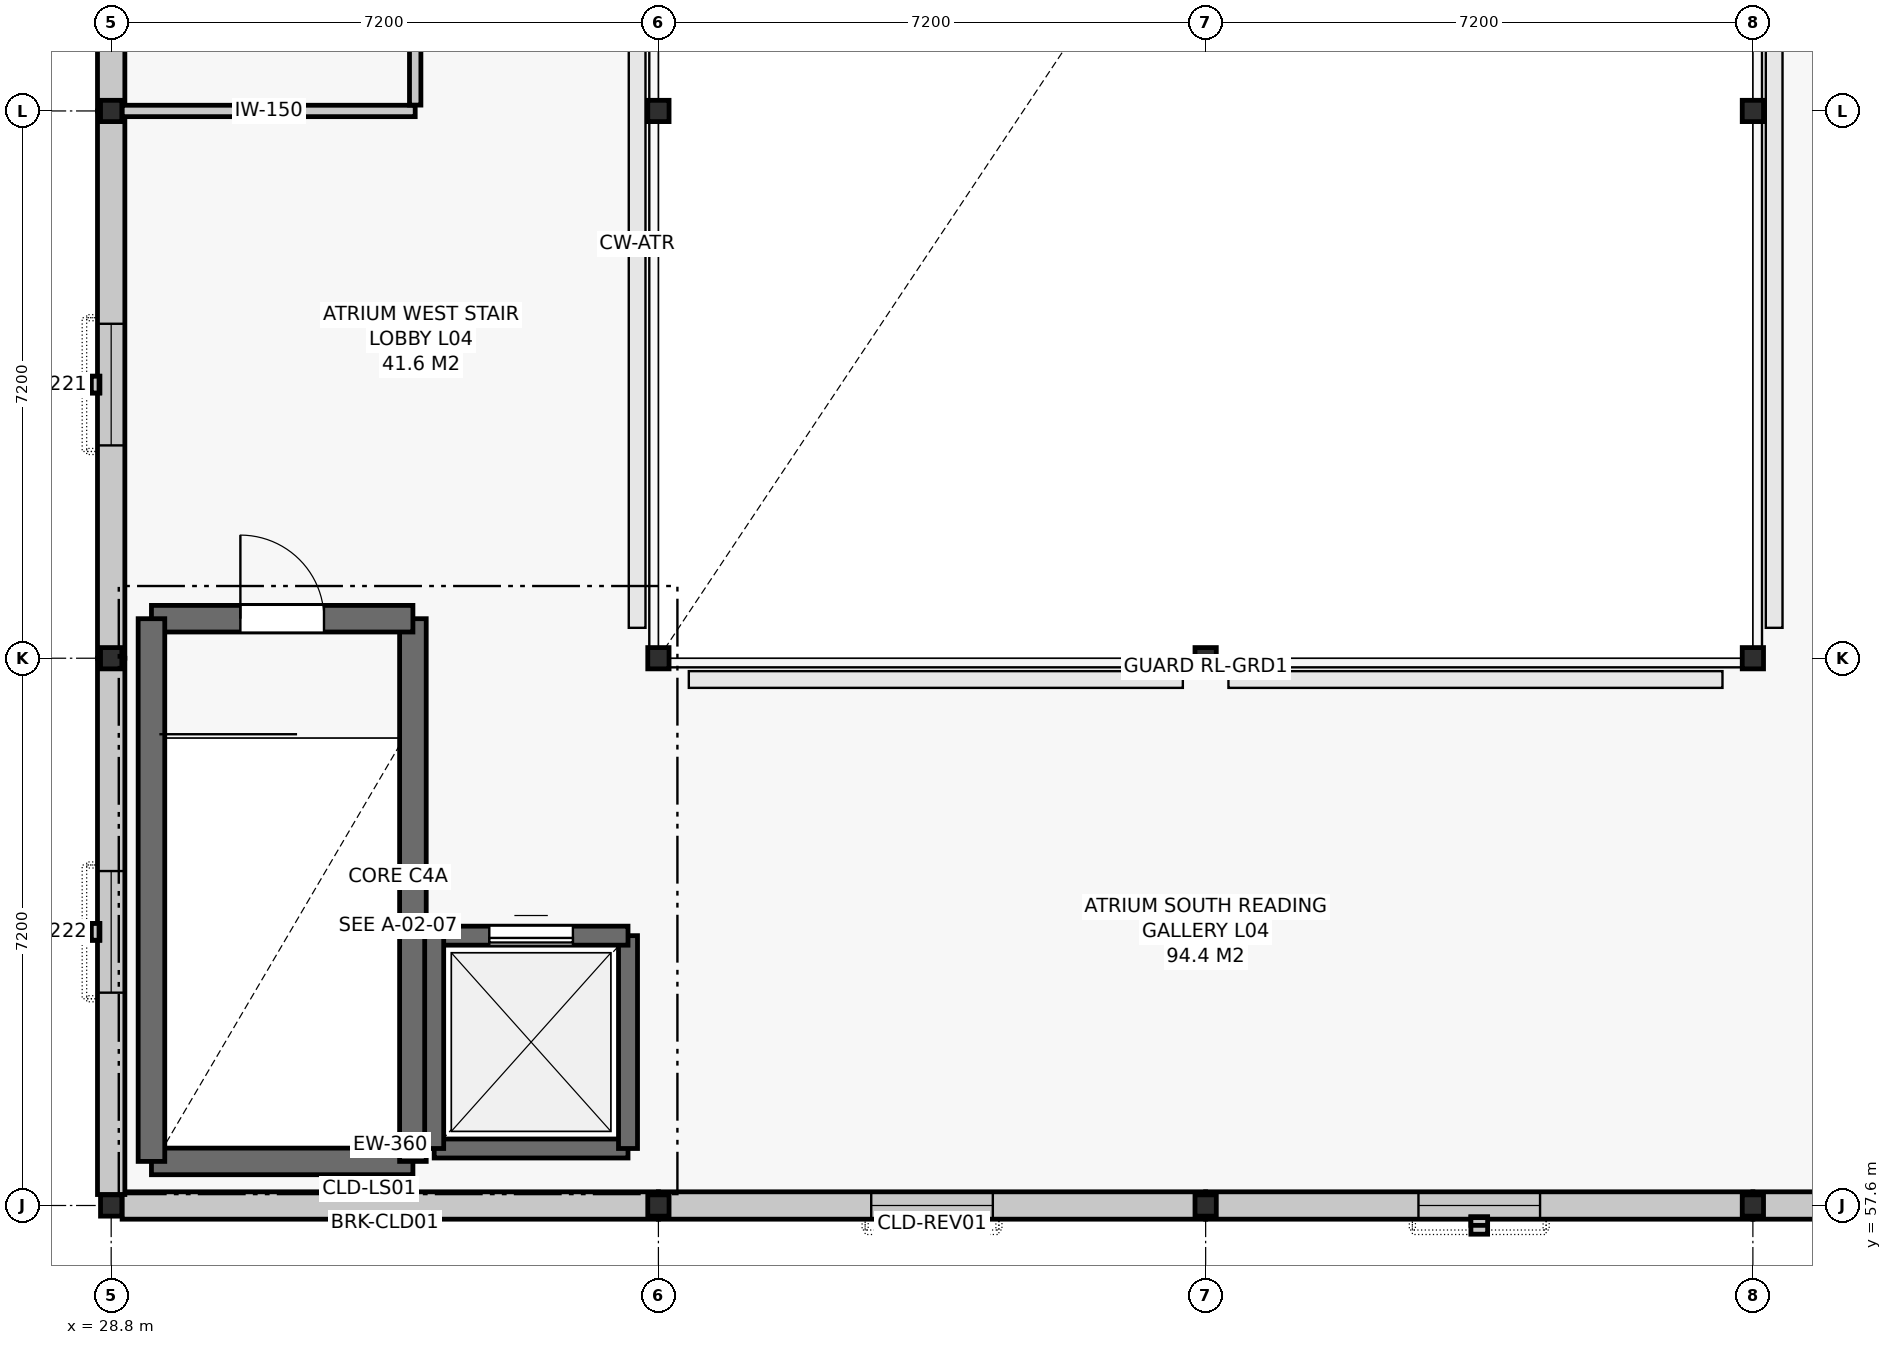
"""IFC4 building model, lengths in metres.
Left out: names, types, materials, properties, quantities, classifications, styles, units other than length and angle.
Written with IfcOpenShell. Run it as: python <this file> out.ifc"""

import sys

from ifc_helpers import new_model, si_unit, direction, frame, frame_2d, origin, origin_2d, place, context, subcontext, project, spatial, rectangle, i_section, extrude, element, fill, save


model = new_model("IFC4")
c1 = context("Model", 3, precision=1e-05, world=origin(), true_north=direction((0.0, 1.0)))
c2 = subcontext(c1, "Body", "Model", "MODEL_VIEW")
j1 = project(units=[si_unit("LENGTHUNIT", "METRE"), si_unit("PLANEANGLEUNIT", "RADIAN")], contexts=[c1])
p1 = place(None, origin())
s1 = spatial("IfcSite", under=j1, at=p1, CompositionType="ELEMENT")
p2 = place(p1, origin())
s2 = spatial("IfcBuilding", under=s1, at=p2, CompositionType="ELEMENT")
p3 = place(p2, frame((0.0, 0.0, 18.6)))
s3 = spatial("IfcBuildingStorey", under=s2, at=p3, CompositionType="ELEMENT", Elevation=18.6)
for number, where, z_axis, x_axis in (
    (1, (28.8, 57.6, 0.0), (0.0, 0.0, 1.0), (1.0, 0.0, 0.0)),
    (2, (28.8, 64.8, 0.0), (0.0, 0.0, 1.0), (1.0, 0.0, 0.0)),
    (3, (28.8, 72.0, 0.0), (0.0, 0.0, 1.0), (1.0, 0.0, 0.0)),
    (4, (36.0, 57.6, 0.0), (0.0, 0.0, 1.0), (1.0, 0.0, 0.0)),
    (5, (36.0, 64.8, 0.0), (0.0, 0.0, 1.0), (1.0, 0.0, 0.0)),
    (6, (36.0, 72.0, 0.0), (0.0, 0.0, 1.0), (1.0, 0.0, 0.0)),
    (7, (43.2, 57.6, 0.0), (0.0, 0.0, 1.0), (1.0, 0.0, 0.0)),
    (8, (43.2, 64.8, 0.0), (0.0, 0.0, 1.0), (1.0, 0.0, 0.0)),
    (9, (50.4, 57.6, 0.0), (0.0, 0.0, 1.0), (1.0, 0.0, 0.0)),
    (10, (50.4, 64.8, 0.0), (0.0, 0.0, 1.0), (1.0, 0.0, 0.0)),
    (11, (50.4, 72.0, 0.0), (0.0, 0.0, 1.0), (1.0, 0.0, 0.0)),
):
    element("IfcColumn", number, at=place(p3, frame(where, z_axis=z_axis, x_axis=x_axis)), inside=s3, PredefinedType="COLUMN", context=c2, shape_type="SweptSolid", body=[
        extrude(i_section(OverallWidth=0.28, OverallDepth=0.28, WebThickness=0.01, FlangeThickness=0.018, FilletRadius=0.024, at=origin_2d()), origin(), (0.0, 0.0, 1.0), 4.2),
    ])
p4 = place(p3, frame((28.944, 57.6, 0.0), z_axis=(0.0, 0.0, 1.0), x_axis=(1.0, 0.0, 0.0)))
e12 = element("IfcWall", 12, at=p4, inside=s3, PredefinedType="SOLIDWALL", context=c2, shape_type="SweptSolid", body=[
    extrude(rectangle(XDim=7.056, YDim=0.36, at=frame_2d((3.528, 0.0))), origin(), (0.0, 0.0, 1.0), 3.24),
])
p5 = place(p3, frame((36.0, 57.6, 0.0), z_axis=(0.0, 0.0, 1.0), x_axis=(1.0, 0.0, 0.0)))
e13 = element("IfcWall", 13, at=p5, inside=s3, PredefinedType="SOLIDWALL", context=c2, shape_type="SweptSolid", body=[
    extrude(rectangle(XDim=7.2, YDim=0.36, at=frame_2d((3.6, 0.0))), origin(), (0.0, 0.0, 1.0), 3.24),
])
p6 = place(p5, frame((2.8, 0.0, 0.95)))
e14 = element("IfcOpeningElement", 14, at=p6, cuts=e13, PredefinedType="OPENING", context=c2, shape_type="SweptSolid", body=[
    extrude(rectangle(XDim=1.6, YDim=1.75, at=frame_2d((0.8, 0.875))), frame((0.0, 0.192, 0.0), z_axis=(0.0, -1.0, 0.0), x_axis=(1.0, 0.0, 0.0)), (0.0, 0.0, 1.0), 0.384),
])
p7 = place(p3, frame((43.2, 57.6, 0.0), z_axis=(0.0, 0.0, 1.0), x_axis=(1.0, 0.0, 0.0)))
e15 = element("IfcWall", 15, at=p7, inside=s3, PredefinedType="SOLIDWALL", context=c2, shape_type="SweptSolid", body=[
    extrude(rectangle(XDim=7.2, YDim=0.36, at=frame_2d((3.6, 0.0))), origin(), (0.0, 0.0, 1.0), 3.24),
])
p8 = place(p7, frame((2.8, 0.0, 0.95)))
e16 = element("IfcOpeningElement", 16, at=p8, cuts=e15, PredefinedType="OPENING", context=c2, shape_type="SweptSolid", body=[
    extrude(rectangle(XDim=1.6, YDim=1.75, at=frame_2d((0.8, 0.875))), frame((0.0, 0.192, 0.0), z_axis=(0.0, -1.0, 0.0), x_axis=(1.0, 0.0, 0.0)), (0.0, 0.0, 1.0), 0.384),
])
p9 = place(p3, frame((50.4, 57.6, 0.0), z_axis=(0.0, 0.0, 1.0), x_axis=(1.0, 0.0, 0.0)))
e17 = element("IfcWall", 17, at=p9, inside=s3, PredefinedType="SOLIDWALL", context=c2, shape_type="SweptSolid", body=[
    extrude(rectangle(XDim=7.056, YDim=0.36, at=frame_2d((3.528, 0.0))), origin(), (0.0, 0.0, 1.0), 3.24),
])
p10 = place(p9, frame((2.8, 0.0, 0.95)))
e18 = element("IfcOpeningElement", 18, at=p10, cuts=e17, PredefinedType="OPENING", context=c2, shape_type="SweptSolid", body=[
    extrude(rectangle(XDim=1.6, YDim=1.75, at=frame_2d((0.8, 0.875))), frame((0.0, 0.192, 0.0), z_axis=(0.0, -1.0, 0.0), x_axis=(1.0, 0.0, 0.0)), (0.0, 0.0, 1.0), 0.384),
])
p11 = place(p3, frame((28.8, 79.2, 0.0), z_axis=(0.0, 0.0, 1.0), x_axis=(0.0, -1.0, 0.0)))
e19 = element("IfcWall", 19, at=p11, inside=s3, PredefinedType="SOLIDWALL", context=c2, shape_type="SweptSolid", body=[
    extrude(rectangle(XDim=7.2, YDim=0.36, at=frame_2d((3.6, 0.0))), origin(), (0.0, 0.0, 1.0), 3.24),
])
p12 = place(p11, frame((2.8, 0.0, 0.95)))
e20 = element("IfcOpeningElement", 20, at=p12, cuts=e19, PredefinedType="OPENING", context=c2, shape_type="SweptSolid", body=[
    extrude(rectangle(XDim=1.6, YDim=1.75, at=frame_2d((0.8, 0.875))), frame((0.0, 0.192, 0.0), z_axis=(0.0, -1.0, 0.0), x_axis=(1.0, 0.0, 0.0)), (0.0, 0.0, 1.0), 0.384),
])
p13 = place(p3, frame((28.8, 72.0, 0.0), z_axis=(0.0, 0.0, 1.0), x_axis=(0.0, -1.0, 0.0)))
e21 = element("IfcWall", 21, at=p13, inside=s3, PredefinedType="SOLIDWALL", context=c2, shape_type="SweptSolid", body=[
    extrude(rectangle(XDim=7.2, YDim=0.36, at=frame_2d((3.6, 0.0))), origin(), (0.0, 0.0, 1.0), 3.24),
])
p14 = place(p13, frame((2.8, 0.0, 0.95)))
e22 = element("IfcOpeningElement", 22, at=p14, cuts=e21, PredefinedType="OPENING", context=c2, shape_type="SweptSolid", body=[
    extrude(rectangle(XDim=1.6, YDim=1.75, at=frame_2d((0.8, 0.875))), frame((0.0, 0.192, 0.0), z_axis=(0.0, -1.0, 0.0), x_axis=(1.0, 0.0, 0.0)), (0.0, 0.0, 1.0), 0.384),
])
p15 = place(p3, frame((28.8, 64.8, 0.0), z_axis=(0.0, 0.0, 1.0), x_axis=(0.0, -1.0, 0.0)))
e23 = element("IfcWall", 23, at=p15, inside=s3, PredefinedType="SOLIDWALL", context=c2, shape_type="SweptSolid", body=[
    extrude(rectangle(XDim=7.056, YDim=0.36, at=frame_2d((3.528, 0.0))), origin(), (0.0, 0.0, 1.0), 3.24),
])
p16 = place(p15, frame((2.8, 0.0, 0.95)))
e24 = element("IfcOpeningElement", 24, at=p16, cuts=e23, PredefinedType="OPENING", context=c2, shape_type="SweptSolid", body=[
    extrude(rectangle(XDim=1.6, YDim=1.75, at=frame_2d((0.8, 0.875))), frame((0.0, 0.192, 0.0), z_axis=(0.0, -1.0, 0.0), x_axis=(1.0, 0.0, 0.0)), (0.0, 0.0, 1.0), 0.384),
])
p17 = place(p3, frame((29.33, 58.18, 0.0), z_axis=(0.0, 0.0, 1.0), x_axis=(1.0, 0.0, 0.0)))
e25 = element("IfcWall", 25, at=p17, inside=s3, PredefinedType="SHEAR", context=c2, shape_type="SweptSolid", body=[
    extrude(rectangle(XDim=3.44, YDim=0.35, at=frame_2d((1.72, 0.0))), origin(), (0.0, 0.0, 1.0), 3.96),
])
p18 = place(p3, frame((32.77, 58.18, 0.0), z_axis=(0.0, 0.0, 1.0), x_axis=(0.0, 1.0, 0.0)))
e26 = element("IfcWall", 26, at=p18, inside=s3, PredefinedType="SHEAR", context=c2, shape_type="SweptSolid", body=[
    extrude(rectangle(XDim=7.14, YDim=0.35, at=frame_2d((3.57, 0.0))), origin(), (0.0, 0.0, 1.0), 3.96),
])
p19 = place(p3, frame((32.77, 65.32, 0.0), z_axis=(0.0, 0.0, 1.0), x_axis=(-1.0, 0.0, 0.0)))
e27 = element("IfcWall", 27, at=p19, inside=s3, PredefinedType="SHEAR", context=c2, shape_type="SweptSolid", body=[
    extrude(rectangle(XDim=3.44, YDim=0.35, at=frame_2d((1.72, 0.0))), origin(), (0.0, 0.0, 1.0), 3.96),
])
p20 = place(p19, frame((1.17, 0.0, 0.0)))
e28 = element("IfcOpeningElement", 28, at=p20, cuts=e27, PredefinedType="OPENING", context=c2, shape_type="SweptSolid", body=[
    extrude(rectangle(XDim=1.1, YDim=2.15, at=frame_2d((0.55, 1.075))), frame((0.0, 0.187, 0.0), z_axis=(0.0, -1.0, 0.0), x_axis=(1.0, 0.0, 0.0)), (0.0, 0.0, 1.0), 0.374),
])
p21 = place(p3, frame((29.33, 65.32, 0.0), z_axis=(0.0, 0.0, 1.0), x_axis=(0.0, -1.0, 0.0)))
e29 = element("IfcWall", 29, at=p21, inside=s3, PredefinedType="SHEAR", context=c2, shape_type="SweptSolid", body=[
    extrude(rectangle(XDim=7.14, YDim=0.35, at=frame_2d((3.57, 0.0))), origin(), (0.0, 0.0, 1.0), 3.96),
])
p22 = place(p3, frame((33.05, 58.35, 0.0), z_axis=(0.0, 0.0, 1.0), x_axis=(1.0, 0.0, 0.0)))
e30 = element("IfcWall", 30, at=p22, inside=s3, PredefinedType="SHEAR", context=c2, shape_type="SweptSolid", body=[
    extrude(rectangle(XDim=2.55, YDim=0.25, at=frame_2d((1.275, 0.0))), origin(), (0.0, 0.0, 1.0), 3.96),
])
p23 = place(p3, frame((35.6, 58.35, 0.0), z_axis=(0.0, 0.0, 1.0), x_axis=(0.0, 1.0, 0.0)))
e31 = element("IfcWall", 31, at=p23, inside=s3, PredefinedType="SHEAR", context=c2, shape_type="SweptSolid", body=[
    extrude(rectangle(XDim=2.8, YDim=0.25, at=frame_2d((1.4, 0.0))), origin(), (0.0, 0.0, 1.0), 3.96),
])
p24 = place(p3, frame((35.6, 61.15, 0.0), z_axis=(0.0, 0.0, 1.0), x_axis=(-1.0, 0.0, 0.0)))
e32 = element("IfcWall", 32, at=p24, inside=s3, PredefinedType="SHEAR", context=c2, shape_type="SweptSolid", body=[
    extrude(rectangle(XDim=2.55, YDim=0.25, at=frame_2d((1.275, 0.0))), origin(), (0.0, 0.0, 1.0), 3.96),
])
p25 = place(p24, frame((0.725, 0.0, 0.0)))
e33 = element("IfcOpeningElement", 33, at=p25, cuts=e32, PredefinedType="OPENING", context=c2, shape_type="SweptSolid", body=[
    extrude(rectangle(XDim=1.1, YDim=2.1, at=frame_2d((0.55, 1.05))), frame((0.0, 0.137, 0.0), z_axis=(0.0, -1.0, 0.0), x_axis=(1.0, 0.0, 0.0)), (0.0, 0.0, 1.0), 0.274),
])
p26 = place(p3, frame((33.05, 61.15, 0.0), z_axis=(0.0, 0.0, 1.0), x_axis=(0.0, -1.0, 0.0)))
e34 = element("IfcWall", 34, at=p26, inside=s3, PredefinedType="SHEAR", context=c2, shape_type="SweptSolid", body=[
    extrude(rectangle(XDim=2.8, YDim=0.25, at=frame_2d((1.4, 0.0))), origin(), (0.0, 0.0, 1.0), 3.96),
])
p27 = place(p3, frame((28.944, 72.0, 0.0), z_axis=(0.0, 0.0, 1.0), x_axis=(1.0, 0.0, 0.0)))
e35 = element("IfcWall", 35, at=p27, inside=s3, PredefinedType="PARTITIONING", context=c2, shape_type="SweptSolid", body=[
    extrude(rectangle(XDim=3.856, YDim=0.15, at=frame_2d((1.928, 0.0))), origin(), (0.0, 0.0, 1.0), 3.635),
])
p28 = place(p3, frame((32.8, 72.077, 0.0), z_axis=(0.0, 0.0, 1.0), x_axis=(0.0, 1.0, 0.0)))
e36 = element("IfcWall", 36, at=p28, inside=s3, PredefinedType="PARTITIONING", context=c2, shape_type="SweptSolid", body=[
    extrude(rectangle(XDim=6.046, YDim=0.15, at=frame_2d((3.023, 0.0))), origin(), (0.0, 0.0, 1.0), 3.635),
])
p29 = place(p28, frame((2.533, 0.0, 0.0)))
e37 = element("IfcOpeningElement", 37, at=p29, cuts=e36, PredefinedType="OPENING", context=c2, shape_type="SweptSolid", body=[
    extrude(rectangle(XDim=0.98, YDim=2.1, at=frame_2d((0.49, 1.05))), frame((0.0, 0.087, 0.0), z_axis=(0.0, -1.0, 0.0), x_axis=(1.0, 0.0, 0.0)), (0.0, 0.0, 1.0), 0.174),
])
p30 = place(p6, origin())
e38 = element("IfcWindow", 38, at=p30, inside=s3, PartitioningType="SINGLE_PANEL", PredefinedType="WINDOW", context=c2, shape_type="SweptSolid", body=[
    extrude(rectangle(XDim=1.6, YDim=1.75, at=frame_2d((0.8, 0.875))), frame((0.0, 0.03, 0.0), z_axis=(0.0, -1.0, 0.0), x_axis=(1.0, 0.0, 0.0)), (0.0, 0.0, 1.0), 0.06),
])
fill(e14, e38)
p31 = place(p8, origin())
e39 = element("IfcWindow", 39, at=p31, inside=s3, PartitioningType="SINGLE_PANEL", PredefinedType="WINDOW", context=c2, shape_type="SweptSolid", body=[
    extrude(rectangle(XDim=1.6, YDim=1.75, at=frame_2d((0.8, 0.875))), frame((0.0, 0.03, 0.0), z_axis=(0.0, -1.0, 0.0), x_axis=(1.0, 0.0, 0.0)), (0.0, 0.0, 1.0), 0.06),
])
fill(e16, e39)
p32 = place(p14, origin())
e40 = element("IfcWindow", 40, at=p32, inside=s3, PartitioningType="SINGLE_PANEL", PredefinedType="WINDOW", context=c2, shape_type="SweptSolid", body=[
    extrude(rectangle(XDim=1.6, YDim=1.75, at=frame_2d((0.8, 0.875))), frame((0.0, 0.03, 0.0), z_axis=(0.0, -1.0, 0.0), x_axis=(1.0, 0.0, 0.0)), (0.0, 0.0, 1.0), 0.06),
])
fill(e22, e40)
p33 = place(p16, origin())
e41 = element("IfcWindow", 41, at=p33, inside=s3, PartitioningType="SINGLE_PANEL", PredefinedType="WINDOW", context=c2, shape_type="SweptSolid", body=[
    extrude(rectangle(XDim=1.6, YDim=1.75, at=frame_2d((0.8, 0.875))), frame((0.0, 0.03, 0.0), z_axis=(0.0, -1.0, 0.0), x_axis=(1.0, 0.0, 0.0)), (0.0, 0.0, 1.0), 0.06),
])
fill(e24, e41)
p34 = place(p20, frame((1.1, 0.0, 0.0), z_axis=(0.0, 0.0, 1.0), x_axis=(-1.0, 0.0, 0.0)))
e42 = element("IfcDoor", 42, at=p34, inside=s3, OperationType="SINGLE_SWING_LEFT", PredefinedType="DOOR", context=c2, shape_type="SweptSolid", body=[
    extrude(rectangle(XDim=1.1, YDim=2.15, at=frame_2d((0.55, 1.075))), frame((0.0, 0.025, 0.0), z_axis=(0.0, -1.0, 0.0), x_axis=(1.0, 0.0, 0.0)), (0.0, 0.0, 1.0), 0.05),
])
fill(e28, e42)
p35 = place(p25, origin())
e43 = element("IfcDoor", 43, at=p35, inside=s3, OperationType="SLIDING_TO_LEFT", PredefinedType="DOOR", context=c2, shape_type="SweptSolid", body=[
    extrude(rectangle(XDim=1.1, YDim=2.1, at=frame_2d((0.55, 1.05))), frame((0.0, 0.025, 0.0), z_axis=(0.0, -1.0, 0.0), x_axis=(1.0, 0.0, 0.0)), (0.0, 0.0, 1.0), 0.05),
])
fill(e33, e43)
save(model, sys.argv[1])
